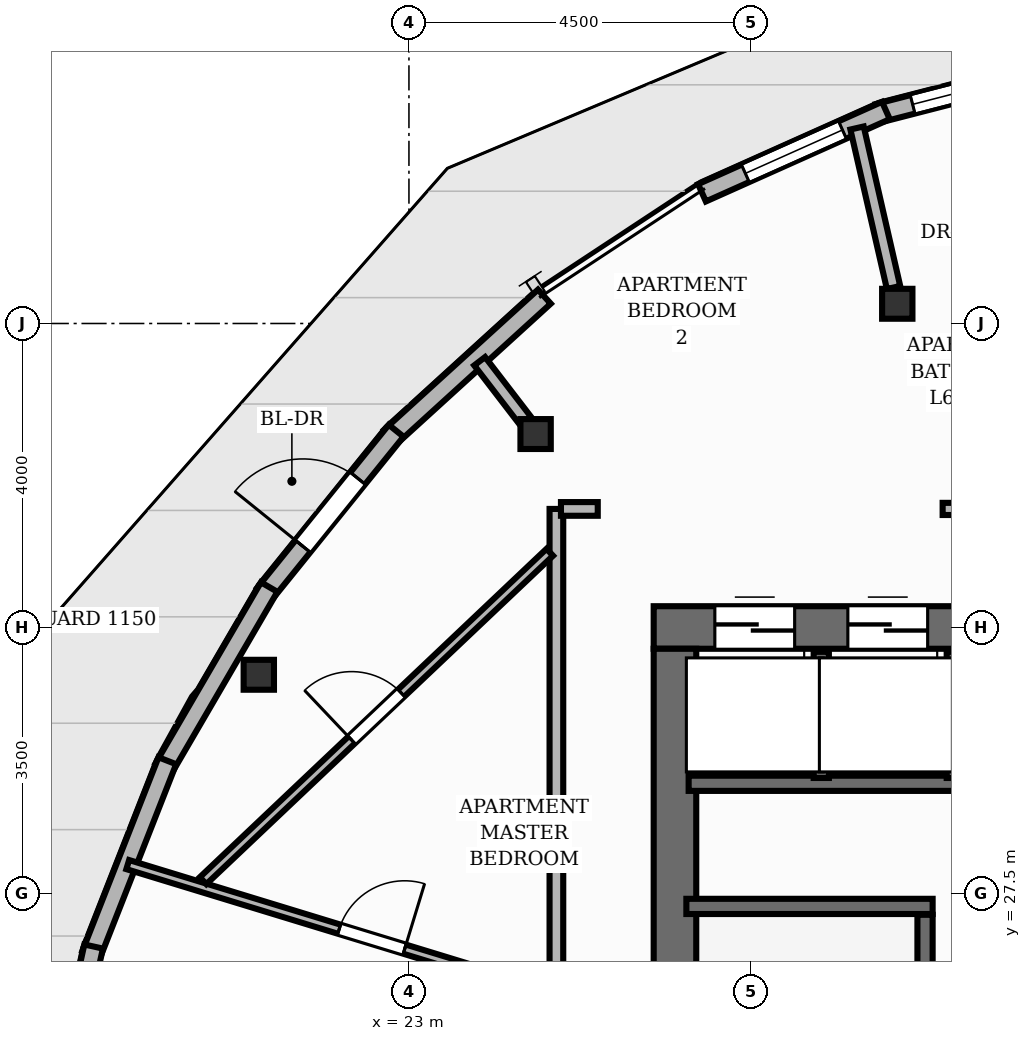
"""IFC4 building model, lengths in metres.
Left out: names, types, materials, properties, quantities, classifications, styles, units other than length and angle.
Written with IfcOpenShell. Run it as: python <this file> out.ifc"""

import sys

from ifc_helpers import new_model, si_unit, direction, frame, frame_2d, origin, origin_2d, place, context, subcontext, project, spatial, rectangle, i_section, extrude, element, fill, save


model = new_model("IFC4")
c1 = context("Model", 3, precision=1e-05, world=origin(), true_north=direction((0.0, 1.0)))
c2 = subcontext(c1, "Body", "Model", "MODEL_VIEW")
j1 = project(units=[si_unit("LENGTHUNIT", "METRE"), si_unit("PLANEANGLEUNIT", "RADIAN")], contexts=[c1])
p1 = place(None, origin())
s1 = spatial("IfcSite", under=j1, at=p1, CompositionType="ELEMENT")
p2 = place(p1, origin())
s2 = spatial("IfcBuilding", under=s1, at=p2, CompositionType="ELEMENT")
p3 = place(p2, frame((0.0, 0.0, 227.04)))
s3 = spatial("IfcBuildingStorey", under=s2, at=p3, CompositionType="ELEMENT", Elevation=227.04)
p4 = place(p3, frame((26.22, 31.0, 0.0), z_axis=(0.0, 0.0, 1.0), x_axis=(1.0, 0.0, 0.0)))
e1 = element("IfcWall", 1, at=p4, inside=s3, PredefinedType="SHEAR", context=c2, shape_type="SweptSolid", body=[
    extrude(rectangle(XDim=11.56, YDim=0.56, at=frame_2d((5.78, 0.0))), origin(), (0.0, 0.0, 1.0), 3.2),
])
p5 = place(p4, frame((8.18, 0.0, 0.0)))
e2 = element("IfcOpeningElement", 2, at=p5, cuts=e1, PredefinedType="OPENING", context=c2, shape_type="SweptSolid", body=[
    extrude(rectangle(XDim=1.1, YDim=2.15, at=frame_2d((0.55, 1.075))), frame((0.0, 0.29, 0.0), z_axis=(0.0, -1.0, 0.0), x_axis=(1.0, 0.0, 0.0)), (0.0, 0.0, 1.0), 0.58),
])
p6 = place(p4, frame((0.805, 0.0, 0.0)))
e3 = element("IfcOpeningElement", 3, at=p6, cuts=e1, PredefinedType="OPENING", context=c2, shape_type="SweptSolid", body=[
    extrude(rectangle(XDim=1.05, YDim=2.15, at=frame_2d((0.525, 1.075))), frame((0.0, 0.29, 0.0), z_axis=(0.0, -1.0, 0.0), x_axis=(1.0, 0.0, 0.0)), (0.0, 0.0, 1.0), 0.58),
])
p7 = place(p4, frame((2.555, 0.0, 0.0)))
e4 = element("IfcOpeningElement", 4, at=p7, cuts=e1, PredefinedType="OPENING", context=c2, shape_type="SweptSolid", body=[
    extrude(rectangle(XDim=1.05, YDim=2.15, at=frame_2d((0.525, 1.075))), frame((0.0, 0.29, 0.0), z_axis=(0.0, -1.0, 0.0), x_axis=(1.0, 0.0, 0.0)), (0.0, 0.0, 1.0), 0.58),
])
p8 = place(p4, frame((4.305, 0.0, 0.0)))
e5 = element("IfcOpeningElement", 5, at=p8, cuts=e1, PredefinedType="OPENING", context=c2, shape_type="SweptSolid", body=[
    extrude(rectangle(XDim=1.05, YDim=2.15, at=frame_2d((0.525, 1.075))), frame((0.0, 0.29, 0.0), z_axis=(0.0, -1.0, 0.0), x_axis=(1.0, 0.0, 0.0)), (0.0, 0.0, 1.0), 0.58),
])
p9 = place(p3, frame((26.5, 17.28, 0.0), z_axis=(0.0, 0.0, 1.0), x_axis=(0.0, 1.0, 0.0)))
e6 = element("IfcWall", 6, at=p9, inside=s3, PredefinedType="SHEAR", context=c2, shape_type="SweptSolid", body=[
    extrude(rectangle(XDim=13.44, YDim=0.56, at=frame_2d((6.72, 0.0))), origin(), (0.0, 0.0, 1.0), 3.2),
])
for number, where, z_axis, x_axis in (
    (7, (29.425, 35.26, 0.0), (0.0, 0.0, 1.0), (1.0, 0.0, 0.0)),
    (8, (24.667, 33.545, 0.0), (0.0, 0.0, 1.0), (1.0, 0.0, 0.0)),
    (9, (21.025, 30.378, 0.0), (0.0, 0.0, 1.0), (1.0, 0.0, 0.0)),
):
    element("IfcColumn", number, at=place(p3, frame(where, z_axis=z_axis, x_axis=x_axis)), inside=s3, PredefinedType="COLUMN", context=c2, shape_type="SweptSolid", body=[
        extrude(i_section(OverallWidth=0.399, OverallDepth=0.394, WebThickness=0.023, FlangeThickness=0.037, at=origin_2d()), origin(), (0.0, 0.0, 1.0), 3.2),
    ])
p10 = place(p3, frame((29.171, 37.766, 0.0), z_axis=(0.0, 0.0, 1.0), x_axis=(0.968423445169, 0.249311112562, 0.0)))
e10 = element("IfcWall", 10, at=p10, inside=s3, PredefinedType="SOLIDWALL", context=c2, shape_type="SweptSolid", body=[
    extrude(rectangle(XDim=2.592, YDim=0.25, at=frame_2d((1.296, 0.0))), origin(), (0.0, 0.0, 1.0), 2.96),
])
p11 = place(p10, frame((0.471, 0.0, 0.85)))
e11 = element("IfcOpeningElement", 11, at=p11, cuts=e10, PredefinedType="OPENING", context=c2, shape_type="SweptSolid", body=[
    extrude(rectangle(XDim=1.65, YDim=1.55, at=frame_2d((0.825, 0.775))), frame((0.0, 0.135, 0.0), z_axis=(0.0, -1.0, 0.0), x_axis=(1.0, 0.0, 0.0)), (0.0, 0.0, 1.0), 0.27),
])
p12 = place(p3, frame((26.855, 36.719, 0.0), z_axis=(0.0, 0.0, 1.0), x_axis=(0.912779399898, 0.408452894617, 0.0)))
e12 = element("IfcWall", 12, at=p12, inside=s3, PredefinedType="SOLIDWALL", context=c2, shape_type="SweptSolid", body=[
    extrude(rectangle(XDim=2.651, YDim=0.25, at=frame_2d((1.325, 0.0))), origin(), (0.0, 0.0, 1.0), 2.96),
])
p13 = place(p12, frame((0.625, 0.0, 0.85)))
e13 = element("IfcOpeningElement", 13, at=p13, cuts=e12, PredefinedType="OPENING", context=c2, shape_type="SweptSolid", body=[
    extrude(rectangle(XDim=1.4, YDim=1.52, at=frame_2d((0.7, 0.76))), frame((0.0, 0.135, 0.0), z_axis=(0.0, -1.0, 0.0), x_axis=(1.0, 0.0, 0.0)), (0.0, 0.0, 1.0), 0.27),
])
p14 = place(p3, frame((22.757, 33.51, 0.0), z_axis=(0.0, 0.0, 1.0), x_axis=(0.739366950434, 0.673302690182, 0.0)))
e14 = element("IfcWall", 14, at=p14, inside=s3, PredefinedType="SOLIDWALL", context=c2, shape_type="SweptSolid", body=[
    extrude(rectangle(XDim=2.738, YDim=0.25, at=frame_2d((1.369, 0.0))), origin(), (0.0, 0.0, 1.0), 2.96),
])
p15 = place(p3, frame((21.1, 31.442, 0.0), z_axis=(0.0, 0.0, 1.0), x_axis=(0.628046541479, 0.778175778174, 0.0)))
e15 = element("IfcWall", 15, at=p15, inside=s3, PredefinedType="SOLIDWALL", context=c2, shape_type="SweptSolid", body=[
    extrude(rectangle(XDim=2.758, YDim=0.25, at=frame_2d((1.379, 0.0))), origin(), (0.0, 0.0, 1.0), 2.96),
])
p16 = place(p15, frame((0.804, 0.0, 0.0)))
e16 = element("IfcOpeningElement", 16, at=p16, cuts=e15, PredefinedType="OPENING", context=c2, shape_type="SweptSolid", body=[
    extrude(rectangle(XDim=1.15, YDim=2.2, at=frame_2d((0.575, 1.1))), frame((0.0, 0.135, 0.0), z_axis=(0.0, -1.0, 0.0), x_axis=(1.0, 0.0, 0.0)), (0.0, 0.0, 1.0), 0.27),
])
p17 = place(p3, frame((19.773, 29.149, 0.0), z_axis=(0.0, 0.0, 1.0), x_axis=(0.503177339128, 0.864183178144, 0.0)))
e17 = element("IfcWall", 17, at=p17, inside=s3, PredefinedType="SOLIDWALL", context=c2, shape_type="SweptSolid", body=[
    extrude(rectangle(XDim=2.758, YDim=0.25, at=frame_2d((1.379, 0.0))), origin(), (0.0, 0.0, 1.0), 2.96),
])
p18 = place(p3, frame((18.82, 26.698, 0.0), z_axis=(0.0, 0.0, 1.0), x_axis=(0.365588934877, 0.930776412838, 0.0)))
e18 = element("IfcWall", 18, at=p18, inside=s3, PredefinedType="SOLIDWALL", context=c2, shape_type="SweptSolid", body=[
    extrude(rectangle(XDim=2.739, YDim=0.25, at=frame_2d((1.369, 0.0))), origin(), (0.0, 0.0, 1.0), 2.577),
])
p19 = place(p3, frame((18.267, 24.164, 0.0), z_axis=(0.0, 0.0, 1.0), x_axis=(0.21633718885, 0.976318708579, 0.0)))
e19 = element("IfcWall", 19, at=p19, inside=s3, PredefinedType="SOLIDWALL", context=c2, shape_type="SweptSolid", body=[
    extrude(rectangle(XDim=2.702, YDim=0.25, at=frame_2d((1.351, 0.0))), origin(), (0.0, 0.0, 1.0), 2.577),
])
p20 = place(p19, frame((0.175, 0.0, 0.85)))
e20 = element("IfcOpeningElement", 20, at=p20, cuts=e19, PredefinedType="OPENING", context=c2, shape_type="SweptSolid", body=[
    extrude(rectangle(XDim=1.65, YDim=1.55, at=frame_2d((0.825, 0.775))), frame((0.0, 0.135, 0.0), z_axis=(0.0, -1.0, 0.0), x_axis=(1.0, 0.0, 0.0)), (0.0, 0.0, 1.0), 0.27),
])
p21 = place(p3, frame((29.79, 20.78, 0.0), z_axis=(0.0, 0.0, 1.0), x_axis=(0.0, 1.0, 0.0)))
e21 = element("IfcWall", 21, at=p21, inside=s3, PredefinedType="SHEAR", context=c2, shape_type="SweptSolid", body=[
    extrude(rectangle(XDim=6.44, YDim=0.2, at=frame_2d((3.22, 0.0))), origin(), (0.0, 0.0, 1.0), 3.2),
])
p22 = place(p3, frame((26.65, 27.33, 0.0), z_axis=(0.0, 0.0, 1.0), x_axis=(1.0, 0.0, 0.0)))
e22 = element("IfcWall", 22, at=p22, inside=s3, PredefinedType="SHEAR", context=c2, shape_type="SweptSolid", body=[
    extrude(rectangle(XDim=3.24, YDim=0.2, at=frame_2d((1.62, 0.0))), origin(), (0.0, 0.0, 1.0), 3.2),
])
p23 = place(p3, frame((26.68, 28.95, 0.0), z_axis=(0.0, 0.0, 1.0), x_axis=(1.0, 0.0, 0.0)))
e23 = element("IfcWall", 23, at=p23, inside=s3, PredefinedType="SHEAR", context=c2, shape_type="SweptSolid", body=[
    extrude(rectangle(XDim=5.24, YDim=0.2, at=frame_2d((2.62, 0.0))), origin(), (0.0, 0.0, 1.0), 3.2),
])
for number, where, z_axis, x_axis in (
    (24, (28.425, 29.02, 0.0), (0.0, 0.0, 1.0), (0.0, 1.0, 0.0)),
    (25, (30.175, 29.02, 0.0), (0.0, 0.0, 1.0), (0.0, 1.0, 0.0)),
):
    element("IfcWall", number, at=place(p3, frame(where, z_axis=z_axis, x_axis=x_axis)), inside=s3, PredefinedType="SHEAR", context=c2, shape_type="SweptSolid", body=[
        extrude(rectangle(XDim=1.66, YDim=0.2, at=frame_2d((0.83, 0.0))), origin(), (0.0, 0.0, 1.0), 3.2),
    ])
p24 = place(p3, frame((29.376, 35.473, 0.0), z_axis=(0.0, 0.0, 1.0), x_axis=(-0.223037236672, 0.974809925605, 0.0)))
e26 = element("IfcWall", 26, at=p24, inside=s3, PredefinedType="PARTITIONING", context=c2, shape_type="SweptSolid", body=[
    extrude(rectangle(XDim=2.153, YDim=0.18, at=frame_2d((1.077, 0.0))), origin(), (0.0, 0.0, 1.0), 2.403),
])
p25 = place(p3, frame((24.533, 33.719, 0.0), z_axis=(0.0, 0.0, 1.0), x_axis=(-0.609245199708, 0.792981895526, 0.0)))
e27 = element("IfcWall", 27, at=p25, inside=s3, PredefinedType="PARTITIONING", context=c2, shape_type="SweptSolid", body=[
    extrude(rectangle(XDim=0.989, YDim=0.18, at=frame_2d((0.494, 0.0))), origin(), (0.0, 0.0, 1.0), 2.403),
])
p26 = place(p3, frame((30.022, 32.56, 0.0), z_axis=(0.0, 0.0, 1.0), x_axis=(1.0, 0.0, 0.0)))
e28 = element("IfcWall", 28, at=p26, inside=s3, PredefinedType="PLUMBINGWALL", context=c2, shape_type="SweptSolid", body=[
    extrude(rectangle(XDim=0.778, YDim=0.16, at=frame_2d((0.389, 0.0))), origin(), (0.0, 0.0, 1.0), 2.955),
])
p27 = place(p3, frame((24.94, 23.384, 0.0), z_axis=(0.0, 0.0, 1.0), x_axis=(0.0, 1.0, 0.0)))
e29 = element("IfcWall", 29, at=p27, inside=s3, PredefinedType="PARTITIONING", context=c2, shape_type="SweptSolid", body=[
    extrude(rectangle(XDim=9.176, YDim=0.18, at=frame_2d((4.588, 0.0))), origin(), (0.0, 0.0, 1.0), 2.955),
])
p28 = place(p27, frame((0.872, 0.0, 0.0)))
e30 = element("IfcOpeningElement", 30, at=p28, cuts=e29, PredefinedType="OPENING", context=c2, shape_type="SweptSolid", body=[
    extrude(rectangle(XDim=1.05, YDim=2.15, at=frame_2d((0.525, 1.075))), frame((0.0, 0.1, 0.0), z_axis=(0.0, -1.0, 0.0), x_axis=(1.0, 0.0, 0.0)), (0.0, 0.0, 1.0), 0.2),
])
p29 = place(p3, frame((25.0, 32.56, 0.0), z_axis=(0.0, 0.0, 1.0), x_axis=(1.0, 0.0, 0.0)))
e31 = element("IfcWall", 31, at=p29, inside=s3, PredefinedType="PARTITIONING", context=c2, shape_type="SweptSolid", body=[
    extrude(rectangle(XDim=0.484, YDim=0.18, at=frame_2d((0.242, 0.0))), origin(), (0.0, 0.0, 1.0), 2.955),
])
p30 = place(p3, frame((19.3, 27.88, 0.0), z_axis=(0.0, 0.0, 1.0), x_axis=(0.956360100331, -0.292190620136, 0.0)))
e32 = element("IfcWall", 32, at=p30, inside=s3, PredefinedType="PARTITIONING", context=c2, shape_type="SweptSolid", body=[
    extrude(rectangle(XDim=5.777, YDim=0.125, at=frame_2d((2.889, 0.0))), origin(), (0.0, 0.0, 1.0), 2.692),
])
p31 = place(p30, frame((2.909, 0.0, 0.0)))
e33 = element("IfcOpeningElement", 33, at=p31, cuts=e32, PredefinedType="OPENING", context=c2, shape_type="SweptSolid", body=[
    extrude(rectangle(XDim=0.9, YDim=2.1, at=frame_2d((0.45, 1.05))), frame((0.0, 0.073, 0.0), z_axis=(0.0, -1.0, 0.0), x_axis=(1.0, 0.0, 0.0)), (0.0, 0.0, 1.0), 0.145),
])
p32 = place(p3, frame((20.292, 27.668, 0.0), z_axis=(0.0, 0.0, 1.0), x_axis=(0.72596595756, 0.68773063656, 0.0)))
e34 = element("IfcWall", 34, at=p32, inside=s3, PredefinedType="PARTITIONING", context=c2, shape_type="SweptSolid", body=[
    extrude(rectangle(XDim=6.283, YDim=0.125, at=frame_2d((3.142, 0.0))), origin(), (0.0, 0.0, 1.0), 2.955),
])
p33 = place(p32, frame((2.692, 0.0, 0.0)))
e35 = element("IfcOpeningElement", 35, at=p33, cuts=e34, PredefinedType="OPENING", context=c2, shape_type="SweptSolid", body=[
    extrude(rectangle(XDim=0.9, YDim=2.1, at=frame_2d((0.45, 1.05))), frame((0.0, 0.073, 0.0), z_axis=(0.0, -1.0, 0.0), x_axis=(1.0, 0.0, 0.0)), (0.0, 0.0, 1.0), 0.145),
])
p34 = place(p16, origin())
e36 = element("IfcDoor", 36, at=p34, inside=s3, OperationType="SINGLE_SWING_LEFT", PredefinedType="DOOR", context=c2, shape_type="SweptSolid", body=[
    extrude(rectangle(XDim=1.15, YDim=2.2, at=frame_2d((0.575, 1.1))), frame((0.0, 0.025, 0.0), z_axis=(0.0, -1.0, 0.0), x_axis=(1.0, 0.0, 0.0)), (0.0, 0.0, 1.0), 0.05),
])
fill(e16, e36)
p35 = place(p11, origin())
e37 = element("IfcWindow", 37, at=p35, inside=s3, PartitioningType="SINGLE_PANEL", PredefinedType="WINDOW", context=c2, shape_type="SweptSolid", body=[
    extrude(rectangle(XDim=1.65, YDim=1.55, at=frame_2d((0.825, 0.775))), frame((0.0, 0.03, 0.0), z_axis=(0.0, -1.0, 0.0), x_axis=(1.0, 0.0, 0.0)), (0.0, 0.0, 1.0), 0.06),
])
fill(e11, e37)
p36 = place(p13, origin())
e38 = element("IfcWindow", 38, at=p36, inside=s3, PartitioningType="SINGLE_PANEL", PredefinedType="WINDOW", context=c2, shape_type="SweptSolid", body=[
    extrude(rectangle(XDim=1.4, YDim=1.52, at=frame_2d((0.7, 0.76))), frame((0.0, 0.03, 0.0), z_axis=(0.0, -1.0, 0.0), x_axis=(1.0, 0.0, 0.0)), (0.0, 0.0, 1.0), 0.06),
])
fill(e13, e38)
p37 = place(p6, origin())
e39 = element("IfcDoor", 39, at=p37, inside=s3, OperationType="DOUBLE_DOOR_SLIDING", PredefinedType="DOOR", context=c2, shape_type="SweptSolid", body=[
    extrude(rectangle(XDim=1.05, YDim=2.15, at=frame_2d((0.525, 1.075))), frame((0.0, 0.025, 0.0), z_axis=(0.0, -1.0, 0.0), x_axis=(1.0, 0.0, 0.0)), (0.0, 0.0, 1.0), 0.05),
])
fill(e3, e39)
p38 = place(p7, origin())
e40 = element("IfcDoor", 40, at=p38, inside=s3, OperationType="DOUBLE_DOOR_SLIDING", PredefinedType="DOOR", context=c2, shape_type="SweptSolid", body=[
    extrude(rectangle(XDim=1.05, YDim=2.15, at=frame_2d((0.525, 1.075))), frame((0.0, 0.025, 0.0), z_axis=(0.0, -1.0, 0.0), x_axis=(1.0, 0.0, 0.0)), (0.0, 0.0, 1.0), 0.05),
])
fill(e4, e40)
p39 = place(p31, origin())
e41 = element("IfcDoor", 41, at=p39, inside=s3, OperationType="SINGLE_SWING_RIGHT", PredefinedType="DOOR", context=c2, shape_type="SweptSolid", body=[
    extrude(rectangle(XDim=0.9, YDim=2.1, at=frame_2d((0.45, 1.05))), frame((0.0, 0.025, 0.0), z_axis=(0.0, -1.0, 0.0), x_axis=(1.0, 0.0, 0.0)), (0.0, 0.0, 1.0), 0.05),
])
fill(e33, e41)
p40 = place(p33, origin())
e42 = element("IfcDoor", 42, at=p40, inside=s3, OperationType="SINGLE_SWING_LEFT", PredefinedType="DOOR", context=c2, shape_type="SweptSolid", body=[
    extrude(rectangle(XDim=0.9, YDim=2.1, at=frame_2d((0.45, 1.05))), frame((0.0, 0.025, 0.0), z_axis=(0.0, -1.0, 0.0), x_axis=(1.0, 0.0, 0.0)), (0.0, 0.0, 1.0), 0.05),
])
fill(e35, e42)
save(model, sys.argv[1])
